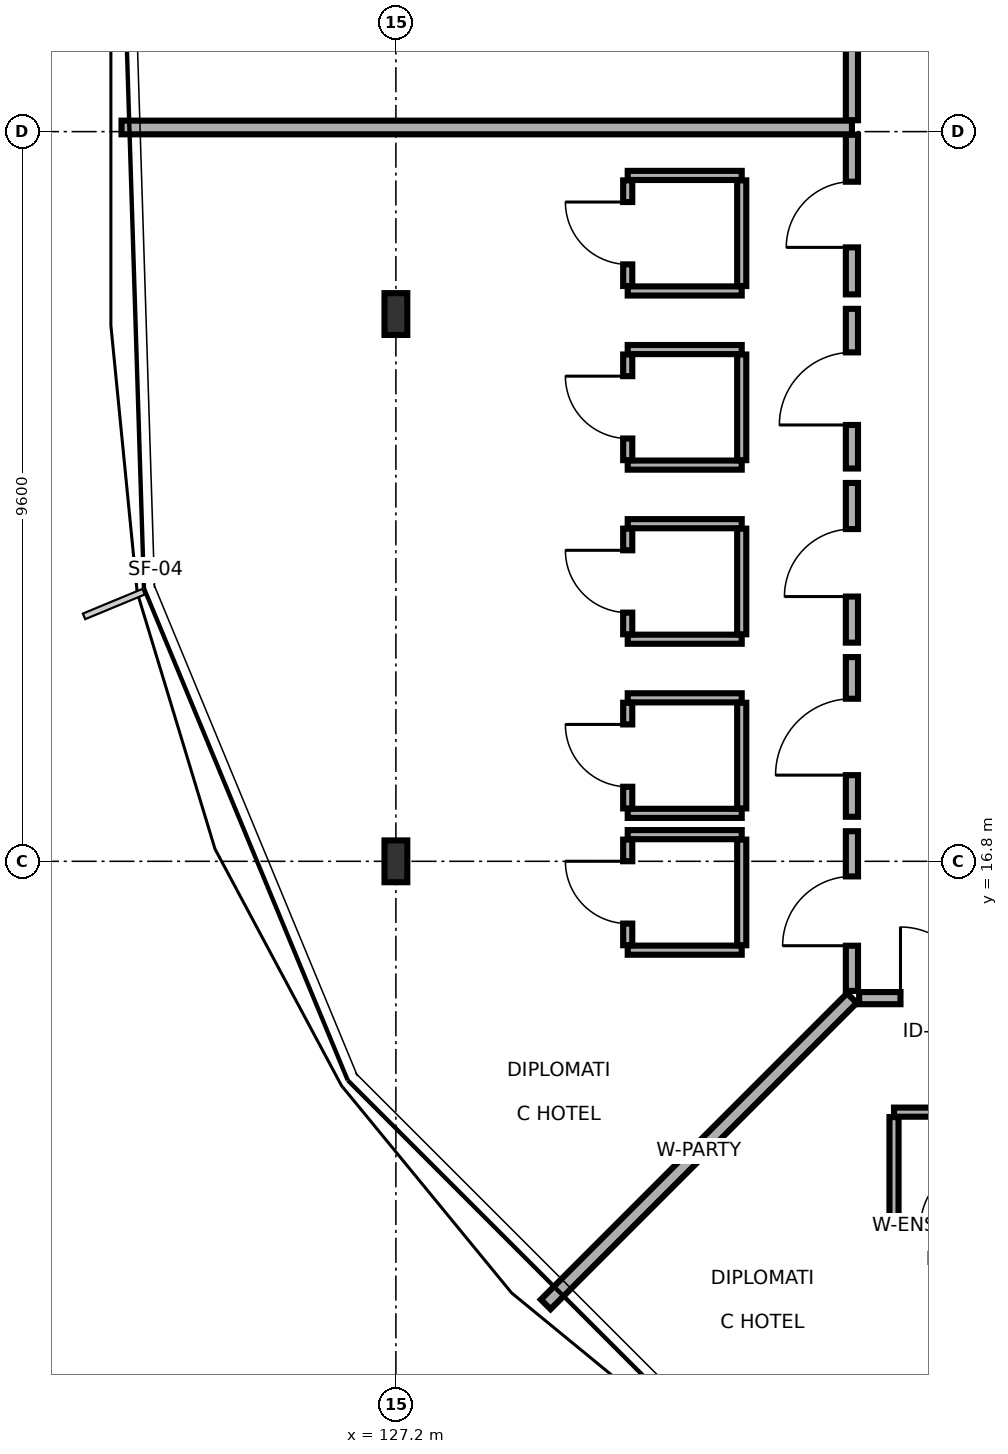
"""IFC4 building model, lengths in metres.
Left out: names, types, materials, properties, quantities, classifications, styles, units other than length and angle.
Written with IfcOpenShell. Run it as: python <this file> out.ifc"""

import sys

from ifc_helpers import new_model, si_unit, direction, frame, frame_2d, origin, origin_2d, place, context, subcontext, project, spatial, rectangle, i_section, extrude, element, fill, save


model = new_model("IFC4")
c1 = context("Model", 3, precision=1e-05, world=origin(), true_north=direction((0.0, 1.0)))
c2 = subcontext(c1, "Body", "Model", "MODEL_VIEW")
j1 = project(units=[si_unit("LENGTHUNIT", "METRE"), si_unit("PLANEANGLEUNIT", "RADIAN")], contexts=[c1])
p1 = place(None, origin())
s1 = spatial("IfcSite", under=j1, at=p1, CompositionType="ELEMENT")
p2 = place(p1, origin())
s2 = spatial("IfcBuilding", under=s1, at=p2, CompositionType="ELEMENT")
p3 = place(p2, frame((0.0, 0.0, 21.5)))
s3 = spatial("IfcBuildingStorey", under=s2, at=p3, CompositionType="ELEMENT", Elevation=21.5)
for number, where, z_axis, x_axis in (
    (1, (127.2, 24.0, 0.0), (0.0, 0.0, 1.0), (1.0, 0.0, 0.0)),
    (2, (127.2, 16.8, 0.0), (0.0, 0.0, 1.0), (1.0, 0.0, 0.0)),
):
    element("IfcColumn", number, at=place(p3, frame(where, z_axis=z_axis, x_axis=x_axis)), inside=s3, PredefinedType="COLUMN", context=c2, shape_type="SweptSolid", body=[
        extrude(i_section(OverallWidth=0.3, OverallDepth=0.55, WebThickness=0.015, FlangeThickness=0.029, FilletRadius=0.027, at=origin_2d()), origin(), (0.0, 0.0, 1.0), 3.4),
    ])
p4 = place(p3, frame((133.2, 26.55, 0.0), z_axis=(0.0, 0.0, 1.0), x_axis=(0.0, 1.0, 0.0)))
e3 = element("IfcWall", 3, at=p4, inside=s3, PredefinedType="PARTITIONING", context=c2, shape_type="SweptSolid", body=[
    extrude(rectangle(XDim=4.392, YDim=0.16, at=frame_2d((2.196, 0.0))), origin(), (0.0, 0.0, 1.0), 3.195),
])
p5 = place(p4, frame((1.446, 0.0, 0.0)))
e4 = element("IfcOpeningElement", 4, at=p5, cuts=e3, PredefinedType="OPENING", context=c2, shape_type="SweptSolid", body=[
    extrude(rectangle(XDim=1.5, YDim=2.25, at=frame_2d((0.75, 1.125))), frame((0.0, 0.09, 0.0), z_axis=(0.0, -1.0, 0.0), x_axis=(1.0, 0.0, 0.0)), (0.0, 0.0, 1.0), 0.18),
])
p6 = place(p3, frame((133.295, 15.0, 0.0), z_axis=(0.0, 0.0, 1.0), x_axis=(1.0, 0.0, 0.0)))
e5 = element("IfcWall", 5, at=p6, inside=s3, PredefinedType="PARTITIONING", context=c2, shape_type="SweptSolid", body=[
    extrude(rectangle(XDim=2.024, YDim=0.16, at=frame_2d((1.012, 0.0))), origin(), (0.0, 0.0, 1.0), 3.195),
])
p7 = place(p6, frame((0.544, 0.0, 0.0)))
e6 = element("IfcOpeningElement", 6, at=p7, cuts=e5, PredefinedType="OPENING", context=c2, shape_type="SweptSolid", body=[
    extrude(rectangle(XDim=0.936, YDim=2.07, at=frame_2d((0.468, 1.035))), frame((0.0, 0.09, 0.0), z_axis=(0.0, -1.0, 0.0), x_axis=(1.0, 0.0, 0.0)), (0.0, 0.0, 1.0), 0.18),
])
p8 = place(p3, frame((133.754, 12.0, 0.0), z_axis=(0.0, 0.0, 1.0), x_axis=(1.0, 0.0, 0.0)))
e7 = element("IfcWall", 7, at=p8, inside=s3, PredefinedType="PARTITIONING", context=c2, shape_type="SweptSolid", body=[
    extrude(rectangle(XDim=1.52, YDim=0.12, at=frame_2d((0.76, 0.0))), origin(), (0.0, 0.0, 1.0), 2.73),
])
p9 = place(p8, frame((0.35, 0.0, 0.0)))
e8 = element("IfcOpeningElement", 8, at=p9, cuts=e7, PredefinedType="OPENING", context=c2, shape_type="SweptSolid", body=[
    extrude(rectangle(XDim=0.82, YDim=2.08, at=frame_2d((0.41, 1.04))), frame((0.0, 0.07, 0.0), z_axis=(0.0, -1.0, 0.0), x_axis=(1.0, 0.0, 0.0)), (0.0, 0.0, 1.0), 0.14),
])
p10 = place(p3, frame((133.754, 13.5, 0.0), z_axis=(0.0, 0.0, 1.0), x_axis=(1.0, 0.0, 0.0)))
e9 = element("IfcWall", 9, at=p10, inside=s3, PredefinedType="PARTITIONING", context=c2, shape_type="SweptSolid", body=[
    extrude(rectangle(XDim=1.52, YDim=0.12, at=frame_2d((0.76, 0.0))), origin(), (0.0, 0.0, 1.0), 3.195),
])
p11 = place(p3, frame((133.754, 12.065, 0.0), z_axis=(0.0, 0.0, 1.0), x_axis=(0.0, 1.0, 0.0)))
e10 = element("IfcWall", 10, at=p11, inside=s3, PredefinedType="PARTITIONING", context=c2, shape_type="SweptSolid", body=[
    extrude(rectangle(XDim=1.37, YDim=0.12, at=frame_2d((0.685, 0.0))), origin(), (0.0, 0.0, 1.0), 3.195),
])
p12 = place(p3, frame((133.2, 15.0, 0.0), z_axis=(0.0, 0.0, 1.0), x_axis=(-0.707106781187, -0.707106781187, 0.0)))
e11 = element("IfcWall", 11, at=p12, inside=s3, PredefinedType="PARTITIONING", context=c2, shape_type="SweptSolid", body=[
    extrude(rectangle(XDim=5.698, YDim=0.18, at=frame_2d((2.849, 0.0))), origin(), (0.0, 0.0, 1.0), 2.68),
])
p13 = place(p3, frame((133.2, 24.259, 0.0), z_axis=(0.0, 0.0, 1.0), x_axis=(0.0, 1.0, 0.0)))
e12 = element("IfcWall", 12, at=p13, inside=s3, PredefinedType="PARTITIONING", context=c2, shape_type="SweptSolid", body=[
    extrude(rectangle(XDim=2.101, YDim=0.16, at=frame_2d((1.051, 0.0))), origin(), (0.0, 0.0, 1.0), 3.195),
])
p14 = place(p13, frame((0.618, 0.0, 0.0)))
e13 = element("IfcOpeningElement", 13, at=p14, cuts=e12, PredefinedType="OPENING", context=c2, shape_type="SweptSolid", body=[
    extrude(rectangle(XDim=0.864, YDim=2.13, at=frame_2d((0.432, 1.065))), frame((0.0, 0.09, 0.0), z_axis=(0.0, -1.0, 0.0), x_axis=(1.0, 0.0, 0.0)), (0.0, 0.0, 1.0), 0.18),
])
for number, where, z_axis, x_axis in (
    (14, (130.25, 24.304, 0.0), (0.0, 0.0, 1.0), (1.0, 0.0, 0.0)),
    (15, (130.25, 25.823, 0.0), (0.0, 0.0, 1.0), (1.0, 0.0, 0.0)),
):
    element("IfcWall", number, at=place(p3, frame(where, z_axis=z_axis, x_axis=x_axis)), inside=s3, PredefinedType="PARTITIONING", context=c2, shape_type="SweptSolid", body=[
        extrude(rectangle(XDim=1.5, YDim=0.12, at=frame_2d((0.75, 0.0))), origin(), (0.0, 0.0, 1.0), 3.195),
    ])
p15 = place(p3, frame((130.25, 24.369, 0.0), z_axis=(0.0, 0.0, 1.0), x_axis=(0.0, 1.0, 0.0)))
e16 = element("IfcWall", 16, at=p15, inside=s3, PredefinedType="PARTITIONING", context=c2, shape_type="SweptSolid", body=[
    extrude(rectangle(XDim=1.39, YDim=0.12, at=frame_2d((0.695, 0.0))), origin(), (0.0, 0.0, 1.0), 3.195),
])
p16 = place(p15, frame((0.285, 0.0, 0.0)))
e17 = element("IfcOpeningElement", 17, at=p16, cuts=e16, PredefinedType="OPENING", context=c2, shape_type="SweptSolid", body=[
    extrude(rectangle(XDim=0.82, YDim=2.08, at=frame_2d((0.41, 1.04))), frame((0.0, 0.07, 0.0), z_axis=(0.0, -1.0, 0.0), x_axis=(1.0, 0.0, 0.0)), (0.0, 0.0, 1.0), 0.14),
])
p17 = place(p3, frame((131.75, 24.369, 0.0), z_axis=(0.0, 0.0, 1.0), x_axis=(0.0, 1.0, 0.0)))
e18 = element("IfcWall", 18, at=p17, inside=s3, PredefinedType="PARTITIONING", context=c2, shape_type="SweptSolid", body=[
    extrude(rectangle(XDim=1.39, YDim=0.12, at=frame_2d((0.695, 0.0))), origin(), (0.0, 0.0, 1.0), 3.195),
])
p18 = place(p3, frame((123.59, 26.455, 0.0), z_axis=(0.0, 0.0, 1.0), x_axis=(1.0, 0.0, 0.0)))
e19 = element("IfcWall", 19, at=p18, inside=s3, PredefinedType="PARTITIONING", context=c2, shape_type="SweptSolid", body=[
    extrude(rectangle(XDim=9.61, YDim=0.18, at=frame_2d((4.805, 0.0))), origin(), (0.0, 0.0, 1.0), 2.68),
])
p19 = place(p3, frame((133.2, 21.968, 0.0), z_axis=(0.0, 0.0, 1.0), x_axis=(0.0, 1.0, 0.0)))
e20 = element("IfcWall", 20, at=p19, inside=s3, PredefinedType="PARTITIONING", context=c2, shape_type="SweptSolid", body=[
    extrude(rectangle(XDim=2.101, YDim=0.16, at=frame_2d((1.05, 0.0))), origin(), (0.0, 0.0, 1.0), 2.73),
])
p20 = place(p19, frame((0.573, 0.0, 0.0)))
e21 = element("IfcOpeningElement", 21, at=p20, cuts=e20, PredefinedType="OPENING", context=c2, shape_type="SweptSolid", body=[
    extrude(rectangle(XDim=0.955, YDim=2.05, at=frame_2d((0.478, 1.025))), frame((0.0, 0.09, 0.0), z_axis=(0.0, -1.0, 0.0), x_axis=(1.0, 0.0, 0.0)), (0.0, 0.0, 1.0), 0.18),
])
for number, where, z_axis, x_axis in (
    (22, (130.25, 22.013, 0.0), (0.0, 0.0, 1.0), (1.0, 0.0, 0.0)),
    (23, (130.25, 23.533, 0.0), (0.0, 0.0, 1.0), (1.0, 0.0, 0.0)),
):
    element("IfcWall", number, at=place(p3, frame(where, z_axis=z_axis, x_axis=x_axis)), inside=s3, PredefinedType="PARTITIONING", context=c2, shape_type="SweptSolid", body=[
        extrude(rectangle(XDim=1.5, YDim=0.12, at=frame_2d((0.75, 0.0))), origin(), (0.0, 0.0, 1.0), 3.195),
    ])
p21 = place(p3, frame((130.25, 22.078, 0.0), z_axis=(0.0, 0.0, 1.0), x_axis=(0.0, 1.0, 0.0)))
e24 = element("IfcWall", 24, at=p21, inside=s3, PredefinedType="PARTITIONING", context=c2, shape_type="SweptSolid", body=[
    extrude(rectangle(XDim=1.39, YDim=0.12, at=frame_2d((0.695, 0.0))), origin(), (0.0, 0.0, 1.0), 3.195),
])
p22 = place(p21, frame((0.285, 0.0, 0.0)))
e25 = element("IfcOpeningElement", 25, at=p22, cuts=e24, PredefinedType="OPENING", context=c2, shape_type="SweptSolid", body=[
    extrude(rectangle(XDim=0.82, YDim=2.08, at=frame_2d((0.41, 1.04))), frame((0.0, 0.07, 0.0), z_axis=(0.0, -1.0, 0.0), x_axis=(1.0, 0.0, 0.0)), (0.0, 0.0, 1.0), 0.14),
])
p23 = place(p3, frame((131.75, 22.078, 0.0), z_axis=(0.0, 0.0, 1.0), x_axis=(0.0, 1.0, 0.0)))
e26 = element("IfcWall", 26, at=p23, inside=s3, PredefinedType="PARTITIONING", context=c2, shape_type="SweptSolid", body=[
    extrude(rectangle(XDim=1.39, YDim=0.12, at=frame_2d((0.695, 0.0))), origin(), (0.0, 0.0, 1.0), 3.195),
])
p24 = place(p3, frame((133.2, 19.677, 0.0), z_axis=(0.0, 0.0, 1.0), x_axis=(0.0, 1.0, 0.0)))
e27 = element("IfcWall", 27, at=p24, inside=s3, PredefinedType="PARTITIONING", context=c2, shape_type="SweptSolid", body=[
    extrude(rectangle(XDim=2.101, YDim=0.16, at=frame_2d((1.05, 0.0))), origin(), (0.0, 0.0, 1.0), 3.195),
])
p25 = place(p24, frame((0.606, 0.0, 0.0)))
e28 = element("IfcOpeningElement", 28, at=p25, cuts=e27, PredefinedType="OPENING", context=c2, shape_type="SweptSolid", body=[
    extrude(rectangle(XDim=0.888, YDim=2.07, at=frame_2d((0.444, 1.035))), frame((0.0, 0.09, 0.0), z_axis=(0.0, -1.0, 0.0), x_axis=(1.0, 0.0, 0.0)), (0.0, 0.0, 1.0), 0.18),
])
for number, where, z_axis, x_axis in (
    (29, (130.25, 19.722, 0.0), (0.0, 0.0, 1.0), (1.0, 0.0, 0.0)),
    (30, (130.25, 21.242, 0.0), (0.0, 0.0, 1.0), (1.0, 0.0, 0.0)),
):
    element("IfcWall", number, at=place(p3, frame(where, z_axis=z_axis, x_axis=x_axis)), inside=s3, PredefinedType="PARTITIONING", context=c2, shape_type="SweptSolid", body=[
        extrude(rectangle(XDim=1.5, YDim=0.12, at=frame_2d((0.75, 0.0))), origin(), (0.0, 0.0, 1.0), 3.195),
    ])
p26 = place(p3, frame((130.25, 19.787, 0.0), z_axis=(0.0, 0.0, 1.0), x_axis=(0.0, 1.0, 0.0)))
e31 = element("IfcWall", 31, at=p26, inside=s3, PredefinedType="PARTITIONING", context=c2, shape_type="SweptSolid", body=[
    extrude(rectangle(XDim=1.39, YDim=0.12, at=frame_2d((0.695, 0.0))), origin(), (0.0, 0.0, 1.0), 3.195),
])
p27 = place(p26, frame((0.285, 0.0, 0.0)))
e32 = element("IfcOpeningElement", 32, at=p27, cuts=e31, PredefinedType="OPENING", context=c2, shape_type="SweptSolid", body=[
    extrude(rectangle(XDim=0.82, YDim=2.08, at=frame_2d((0.41, 1.04))), frame((0.0, 0.07, 0.0), z_axis=(0.0, -1.0, 0.0), x_axis=(1.0, 0.0, 0.0)), (0.0, 0.0, 1.0), 0.14),
])
p28 = place(p3, frame((131.75, 19.787, 0.0), z_axis=(0.0, 0.0, 1.0), x_axis=(0.0, 1.0, 0.0)))
e33 = element("IfcWall", 33, at=p28, inside=s3, PredefinedType="PARTITIONING", context=c2, shape_type="SweptSolid", body=[
    extrude(rectangle(XDim=1.39, YDim=0.12, at=frame_2d((0.695, 0.0))), origin(), (0.0, 0.0, 1.0), 3.195),
])
p29 = place(p3, frame((133.2, 17.386, 0.0), z_axis=(0.0, 0.0, 1.0), x_axis=(0.0, 1.0, 0.0)))
e34 = element("IfcWall", 34, at=p29, inside=s3, PredefinedType="PARTITIONING", context=c2, shape_type="SweptSolid", body=[
    extrude(rectangle(XDim=2.101, YDim=0.16, at=frame_2d((1.05, 0.0))), origin(), (0.0, 0.0, 1.0), 3.195),
])
p30 = place(p29, frame((0.548, 0.0, 0.0)))
e35 = element("IfcOpeningElement", 35, at=p30, cuts=e34, PredefinedType="OPENING", context=c2, shape_type="SweptSolid", body=[
    extrude(rectangle(XDim=1.005, YDim=2.05, at=frame_2d((0.502, 1.025))), frame((0.0, 0.09, 0.0), z_axis=(0.0, -1.0, 0.0), x_axis=(1.0, 0.0, 0.0)), (0.0, 0.0, 1.0), 0.18),
])
for number, where, z_axis, x_axis in (
    (36, (130.25, 17.431, 0.0), (0.0, 0.0, 1.0), (1.0, 0.0, 0.0)),
    (37, (130.25, 18.951, 0.0), (0.0, 0.0, 1.0), (1.0, 0.0, 0.0)),
):
    element("IfcWall", number, at=place(p3, frame(where, z_axis=z_axis, x_axis=x_axis)), inside=s3, PredefinedType="PARTITIONING", context=c2, shape_type="SweptSolid", body=[
        extrude(rectangle(XDim=1.5, YDim=0.12, at=frame_2d((0.75, 0.0))), origin(), (0.0, 0.0, 1.0), 3.195),
    ])
p31 = place(p3, frame((130.25, 17.496, 0.0), z_axis=(0.0, 0.0, 1.0), x_axis=(0.0, 1.0, 0.0)))
e38 = element("IfcWall", 38, at=p31, inside=s3, PredefinedType="PARTITIONING", context=c2, shape_type="SweptSolid", body=[
    extrude(rectangle(XDim=1.39, YDim=0.12, at=frame_2d((0.695, 0.0))), origin(), (0.0, 0.0, 1.0), 3.195),
])
p32 = place(p31, frame((0.285, 0.0, 0.0)))
e39 = element("IfcOpeningElement", 39, at=p32, cuts=e38, PredefinedType="OPENING", context=c2, shape_type="SweptSolid", body=[
    extrude(rectangle(XDim=0.82, YDim=2.08, at=frame_2d((0.41, 1.04))), frame((0.0, 0.07, 0.0), z_axis=(0.0, -1.0, 0.0), x_axis=(1.0, 0.0, 0.0)), (0.0, 0.0, 1.0), 0.14),
])
p33 = place(p3, frame((131.75, 17.496, 0.0), z_axis=(0.0, 0.0, 1.0), x_axis=(0.0, 1.0, 0.0)))
e40 = element("IfcWall", 40, at=p33, inside=s3, PredefinedType="PARTITIONING", context=c2, shape_type="SweptSolid", body=[
    extrude(rectangle(XDim=1.39, YDim=0.12, at=frame_2d((0.695, 0.0))), origin(), (0.0, 0.0, 1.0), 3.195),
])
p34 = place(p3, frame((133.2, 15.095, 0.0), z_axis=(0.0, 0.0, 1.0), x_axis=(0.0, 1.0, 0.0)))
e41 = element("IfcWall", 41, at=p34, inside=s3, PredefinedType="PARTITIONING", context=c2, shape_type="SweptSolid", body=[
    extrude(rectangle(XDim=2.101, YDim=0.16, at=frame_2d((1.05, 0.0))), origin(), (0.0, 0.0, 1.0), 2.73),
])
p35 = place(p34, frame((0.594, 0.0, 0.0)))
e42 = element("IfcOpeningElement", 42, at=p35, cuts=e41, PredefinedType="OPENING", context=c2, shape_type="SweptSolid", body=[
    extrude(rectangle(XDim=0.912, YDim=2.13, at=frame_2d((0.456, 1.065))), frame((0.0, 0.09, 0.0), z_axis=(0.0, -1.0, 0.0), x_axis=(1.0, 0.0, 0.0)), (0.0, 0.0, 1.0), 0.18),
])
for number, where, z_axis, x_axis in (
    (43, (130.25, 15.631, 0.0), (0.0, 0.0, 1.0), (1.0, 0.0, 0.0)),
    (44, (130.25, 17.151, 0.0), (0.0, 0.0, 1.0), (1.0, 0.0, 0.0)),
):
    element("IfcWall", number, at=place(p3, frame(where, z_axis=z_axis, x_axis=x_axis)), inside=s3, PredefinedType="PARTITIONING", context=c2, shape_type="SweptSolid", body=[
        extrude(rectangle(XDim=1.5, YDim=0.12, at=frame_2d((0.75, 0.0))), origin(), (0.0, 0.0, 1.0), 3.195),
    ])
p36 = place(p3, frame((130.25, 15.696, 0.0), z_axis=(0.0, 0.0, 1.0), x_axis=(0.0, 1.0, 0.0)))
e45 = element("IfcWall", 45, at=p36, inside=s3, PredefinedType="PARTITIONING", context=c2, shape_type="SweptSolid", body=[
    extrude(rectangle(XDim=1.39, YDim=0.12, at=frame_2d((0.695, 0.0))), origin(), (0.0, 0.0, 1.0), 2.73),
])
p37 = place(p36, frame((0.285, 0.0, 0.0)))
e46 = element("IfcOpeningElement", 46, at=p37, cuts=e45, PredefinedType="OPENING", context=c2, shape_type="SweptSolid", body=[
    extrude(rectangle(XDim=0.82, YDim=2.08, at=frame_2d((0.41, 1.04))), frame((0.0, 0.07, 0.0), z_axis=(0.0, -1.0, 0.0), x_axis=(1.0, 0.0, 0.0)), (0.0, 0.0, 1.0), 0.14),
])
p38 = place(p3, frame((131.75, 15.696, 0.0), z_axis=(0.0, 0.0, 1.0), x_axis=(0.0, 1.0, 0.0)))
e47 = element("IfcWall", 47, at=p38, inside=s3, PredefinedType="PARTITIONING", context=c2, shape_type="SweptSolid", body=[
    extrude(rectangle(XDim=1.39, YDim=0.12, at=frame_2d((0.695, 0.0))), origin(), (0.0, 0.0, 1.0), 2.73),
])
p39 = place(p7, origin())
e48 = element("IfcDoor", 48, at=p39, inside=s3, OperationType="SINGLE_SWING_LEFT", PredefinedType="DOOR", context=c2, shape_type="SweptSolid", body=[
    extrude(rectangle(XDim=0.936, YDim=2.07, at=frame_2d((0.468, 1.035))), frame((0.0, 0.025, 0.0), z_axis=(0.0, -1.0, 0.0), x_axis=(1.0, 0.0, 0.0)), (0.0, 0.0, 1.0), 0.05),
])
fill(e6, e48)
p40 = place(p9, origin())
e49 = element("IfcDoor", 49, at=p40, inside=s3, OperationType="SINGLE_SWING_RIGHT", PredefinedType="DOOR", context=c2, shape_type="SweptSolid", body=[
    extrude(rectangle(XDim=0.82, YDim=2.08, at=frame_2d((0.41, 1.04))), frame((0.0, 0.025, 0.0), z_axis=(0.0, -1.0, 0.0), x_axis=(1.0, 0.0, 0.0)), (0.0, 0.0, 1.0), 0.05),
])
fill(e8, e49)
p41 = place(p14, origin())
e50 = element("IfcDoor", 50, at=p41, inside=s3, OperationType="SINGLE_SWING_LEFT", PredefinedType="DOOR", context=c2, shape_type="SweptSolid", body=[
    extrude(rectangle(XDim=0.864, YDim=2.13, at=frame_2d((0.432, 1.065))), frame((0.0, 0.025, 0.0), z_axis=(0.0, -1.0, 0.0), x_axis=(1.0, 0.0, 0.0)), (0.0, 0.0, 1.0), 0.05),
])
fill(e13, e50)
p42 = place(p16, origin())
e51 = element("IfcDoor", 51, at=p42, inside=s3, OperationType="SINGLE_SWING_RIGHT", PredefinedType="DOOR", context=c2, shape_type="SweptSolid", body=[
    extrude(rectangle(XDim=0.82, YDim=2.08, at=frame_2d((0.41, 1.04))), frame((0.0, 0.025, 0.0), z_axis=(0.0, -1.0, 0.0), x_axis=(1.0, 0.0, 0.0)), (0.0, 0.0, 1.0), 0.05),
])
fill(e17, e51)
p43 = place(p20, origin())
e52 = element("IfcDoor", 52, at=p43, inside=s3, OperationType="SINGLE_SWING_LEFT", PredefinedType="DOOR", context=c2, shape_type="SweptSolid", body=[
    extrude(rectangle(XDim=0.955, YDim=2.05, at=frame_2d((0.478, 1.025))), frame((0.0, 0.025, 0.0), z_axis=(0.0, -1.0, 0.0), x_axis=(1.0, 0.0, 0.0)), (0.0, 0.0, 1.0), 0.05),
])
fill(e21, e52)
p44 = place(p22, origin())
e53 = element("IfcDoor", 53, at=p44, inside=s3, OperationType="SINGLE_SWING_RIGHT", PredefinedType="DOOR", context=c2, shape_type="SweptSolid", body=[
    extrude(rectangle(XDim=0.82, YDim=2.08, at=frame_2d((0.41, 1.04))), frame((0.0, 0.025, 0.0), z_axis=(0.0, -1.0, 0.0), x_axis=(1.0, 0.0, 0.0)), (0.0, 0.0, 1.0), 0.05),
])
fill(e25, e53)
p45 = place(p25, origin())
e54 = element("IfcDoor", 54, at=p45, inside=s3, OperationType="SINGLE_SWING_LEFT", PredefinedType="DOOR", context=c2, shape_type="SweptSolid", body=[
    extrude(rectangle(XDim=0.888, YDim=2.07, at=frame_2d((0.444, 1.035))), frame((0.0, 0.025, 0.0), z_axis=(0.0, -1.0, 0.0), x_axis=(1.0, 0.0, 0.0)), (0.0, 0.0, 1.0), 0.05),
])
fill(e28, e54)
p46 = place(p27, origin())
e55 = element("IfcDoor", 55, at=p46, inside=s3, OperationType="SINGLE_SWING_RIGHT", PredefinedType="DOOR", context=c2, shape_type="SweptSolid", body=[
    extrude(rectangle(XDim=0.82, YDim=2.08, at=frame_2d((0.41, 1.04))), frame((0.0, 0.025, 0.0), z_axis=(0.0, -1.0, 0.0), x_axis=(1.0, 0.0, 0.0)), (0.0, 0.0, 1.0), 0.05),
])
fill(e32, e55)
p47 = place(p30, origin())
e56 = element("IfcDoor", 56, at=p47, inside=s3, OperationType="SINGLE_SWING_LEFT", PredefinedType="DOOR", context=c2, shape_type="SweptSolid", body=[
    extrude(rectangle(XDim=1.005, YDim=2.05, at=frame_2d((0.502, 1.025))), frame((0.0, 0.025, 0.0), z_axis=(0.0, -1.0, 0.0), x_axis=(1.0, 0.0, 0.0)), (0.0, 0.0, 1.0), 0.05),
])
fill(e35, e56)
p48 = place(p32, origin())
e57 = element("IfcDoor", 57, at=p48, inside=s3, OperationType="SINGLE_SWING_RIGHT", PredefinedType="DOOR", context=c2, shape_type="SweptSolid", body=[
    extrude(rectangle(XDim=0.82, YDim=2.08, at=frame_2d((0.41, 1.04))), frame((0.0, 0.025, 0.0), z_axis=(0.0, -1.0, 0.0), x_axis=(1.0, 0.0, 0.0)), (0.0, 0.0, 1.0), 0.05),
])
fill(e39, e57)
p49 = place(p35, origin())
e58 = element("IfcDoor", 58, at=p49, inside=s3, OperationType="SINGLE_SWING_LEFT", PredefinedType="DOOR", context=c2, shape_type="SweptSolid", body=[
    extrude(rectangle(XDim=0.912, YDim=2.13, at=frame_2d((0.456, 1.065))), frame((0.0, 0.025, 0.0), z_axis=(0.0, -1.0, 0.0), x_axis=(1.0, 0.0, 0.0)), (0.0, 0.0, 1.0), 0.05),
])
fill(e42, e58)
p50 = place(p37, origin())
e59 = element("IfcDoor", 59, at=p50, inside=s3, OperationType="SINGLE_SWING_RIGHT", PredefinedType="DOOR", context=c2, shape_type="SweptSolid", body=[
    extrude(rectangle(XDim=0.82, YDim=2.08, at=frame_2d((0.41, 1.04))), frame((0.0, 0.025, 0.0), z_axis=(0.0, -1.0, 0.0), x_axis=(1.0, 0.0, 0.0)), (0.0, 0.0, 1.0), 0.05),
])
fill(e46, e59)
save(model, sys.argv[1])
